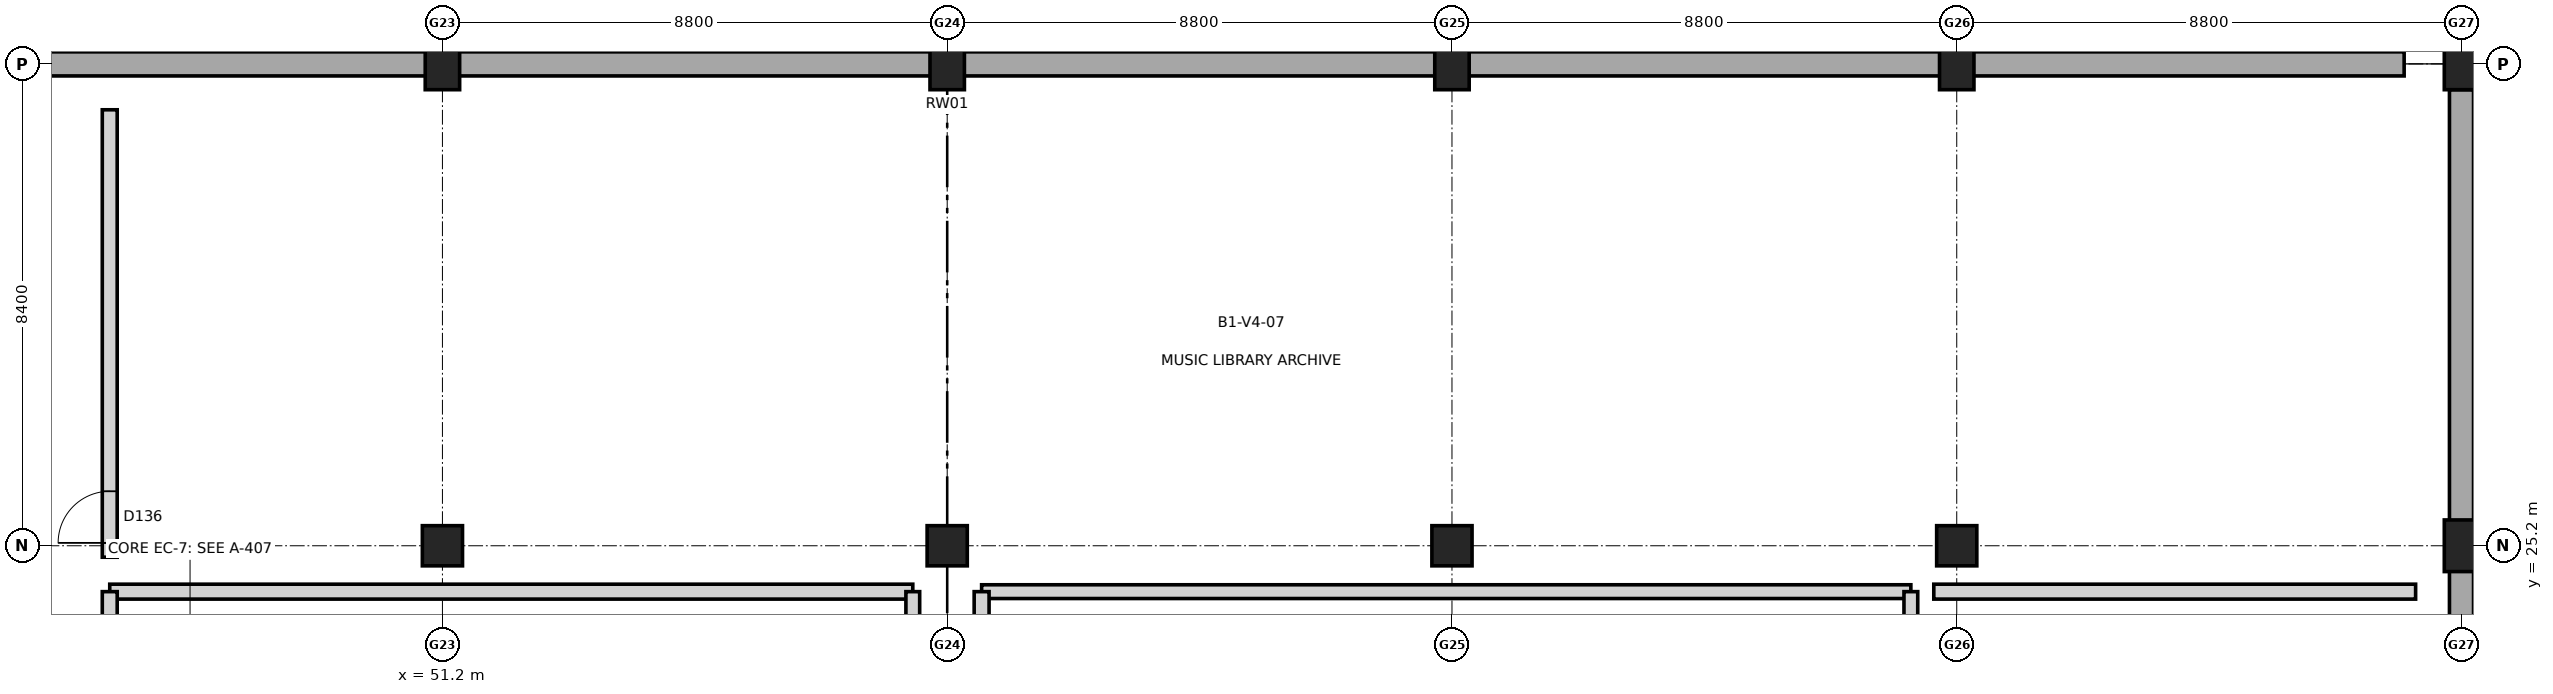
"""IFC4 building model, lengths in metres.
Left out: names, types, materials, properties, quantities, classifications, styles, units other than length and angle.
Written with IfcOpenShell. Run it as: python <this file> out.ifc"""

import sys

from ifc_helpers import new_model, si_unit, direction, frame, frame_2d, origin, origin_2d, place, context, subcontext, project, spatial, rectangle, extrude, element, fill, save


model = new_model("IFC4")
c1 = context("Model", 3, precision=1e-05, world=origin(), true_north=direction((0.0, 1.0)))
c2 = subcontext(c1, "Body", "Model", "MODEL_VIEW")
j1 = project(units=[si_unit("LENGTHUNIT", "METRE"), si_unit("PLANEANGLEUNIT", "RADIAN")], contexts=[c1])
p1 = place(None, origin())
s1 = spatial("IfcSite", under=j1, at=p1, CompositionType="ELEMENT")
p2 = place(p1, origin())
s2 = spatial("IfcBuilding", under=s1, at=p2, CompositionType="ELEMENT")
p3 = place(p2, frame((0.0, 0.0, -5.4)))
s3 = spatial("IfcBuildingStorey", under=s2, at=p3, CompositionType="ELEMENT", Elevation=-5.4)
p4 = place(p3, frame((51.2, 25.2, 0.0), z_axis=(0.0, 0.0, 1.0), x_axis=(1.0, 0.0, 0.0)))
e1 = element("IfcColumn", 1, at=p4, inside=s3, PredefinedType="COLUMN", context=c2, shape_type="SweptSolid", body=[
    extrude(rectangle(XDim=0.7, YDim=0.7, at=origin_2d()), origin(), (0.0, 0.0, 1.0), 5.4),
])
p5 = place(p3, frame((51.2, 33.6, 0.0), z_axis=(0.0, 0.0, 1.0), x_axis=(1.0, 0.0, 0.0)))
e2 = element("IfcColumn", 2, at=p5, inside=s3, PredefinedType="COLUMN", context=c2, shape_type="SweptSolid", body=[
    extrude(rectangle(XDim=0.6, YDim=0.9, at=origin_2d()), origin(), (0.0, 0.0, 1.0), 5.4),
])
p6 = place(p3, frame((60.0, 25.2, 0.0), z_axis=(0.0, 0.0, 1.0), x_axis=(1.0, 0.0, 0.0)))
e3 = element("IfcColumn", 3, at=p6, inside=s3, PredefinedType="COLUMN", context=c2, shape_type="SweptSolid", body=[
    extrude(rectangle(XDim=0.7, YDim=0.7, at=origin_2d()), origin(), (0.0, 0.0, 1.0), 5.4),
])
p7 = place(p3, frame((60.0, 33.6, 0.0), z_axis=(0.0, 0.0, 1.0), x_axis=(1.0, 0.0, 0.0)))
e4 = element("IfcColumn", 4, at=p7, inside=s3, PredefinedType="COLUMN", context=c2, shape_type="SweptSolid", body=[
    extrude(rectangle(XDim=0.6, YDim=0.9, at=origin_2d()), origin(), (0.0, 0.0, 1.0), 5.4),
])
p8 = place(p3, frame((68.8, 25.2, 0.0), z_axis=(0.0, 0.0, 1.0), x_axis=(1.0, 0.0, 0.0)))
e5 = element("IfcColumn", 5, at=p8, inside=s3, PredefinedType="COLUMN", context=c2, shape_type="SweptSolid", body=[
    extrude(rectangle(XDim=0.7, YDim=0.7, at=origin_2d()), origin(), (0.0, 0.0, 1.0), 5.4),
])
p9 = place(p3, frame((68.8, 33.6, 0.0), z_axis=(0.0, 0.0, 1.0), x_axis=(1.0, 0.0, 0.0)))
e6 = element("IfcColumn", 6, at=p9, inside=s3, PredefinedType="COLUMN", context=c2, shape_type="SweptSolid", body=[
    extrude(rectangle(XDim=0.6, YDim=0.9, at=origin_2d()), origin(), (0.0, 0.0, 1.0), 5.4),
])
p10 = place(p3, frame((77.6, 25.2, 0.0), z_axis=(0.0, 0.0, 1.0), x_axis=(1.0, 0.0, 0.0)))
e7 = element("IfcColumn", 7, at=p10, inside=s3, PredefinedType="COLUMN", context=c2, shape_type="SweptSolid", body=[
    extrude(rectangle(XDim=0.7, YDim=0.7, at=origin_2d()), origin(), (0.0, 0.0, 1.0), 5.4),
])
for number, where, z_axis, x_axis in (
    (8, (77.6, 33.6, 0.0), (0.0, 0.0, 1.0), (1.0, 0.0, 0.0)),
    (9, (86.4, 25.2, 0.0), (0.0, 0.0, 1.0), (1.0, 0.0, 0.0)),
    (10, (86.4, 33.6, 0.0), (0.0, 0.0, 1.0), (1.0, 0.0, 0.0)),
):
    element("IfcColumn", number, at=place(p3, frame(where, z_axis=z_axis, x_axis=x_axis)), inside=s3, PredefinedType="COLUMN", context=c2, shape_type="SweptSolid", body=[
        extrude(rectangle(XDim=0.6, YDim=0.9, at=origin_2d()), origin(), (0.0, 0.0, 1.0), 5.4),
    ])
p11 = place(p3, frame((86.4, -37.35, 0.0), z_axis=(0.0, 0.0, 1.0), x_axis=(0.0, 1.0, 0.0)))
e11 = element("IfcWall", 11, at=p11, inside=s3, PredefinedType="USERDEFINED", context=c2, shape_type="SweptSolid", body=[
    extrude(rectangle(XDim=70.5, YDim=0.42, at=frame_2d((35.25, 0.0))), origin(), (0.0, 0.0, 1.0), 5.11),
])
p12 = place(p3, frame((34.6, 33.6, 0.0), z_axis=(0.0, 0.0, 1.0), x_axis=(1.0, 0.0, 0.0)))
e12 = element("IfcWall", 12, at=p12, inside=s3, PredefinedType="USERDEFINED", context=c2, shape_type="SweptSolid", body=[
    extrude(rectangle(XDim=50.8, YDim=0.42, at=frame_2d((25.4, 0.0))), origin(), (0.0, 0.0, 1.0), 5.11),
])
p13 = place(p3, frame((45.4, 24.4, 0.0), z_axis=(0.0, 0.0, 1.0), x_axis=(1.0, 0.0, 0.0)))
e13 = element("IfcWall", 13, at=p13, inside=s3, PredefinedType="PARTITIONING", context=c2, shape_type="SweptSolid", body=[
    extrude(rectangle(XDim=14.0, YDim=0.26, at=frame_2d((7.0, 0.0))), origin(), (0.0, 0.0, 1.0), 5.02),
])
p14 = place(p3, frame((45.4, 22.7, 0.0), z_axis=(0.0, 0.0, 1.0), x_axis=(0.0, 1.0, 0.0)))
e14 = element("IfcWall", 14, at=p14, inside=s3, PredefinedType="PARTITIONING", context=c2, shape_type="SweptSolid", body=[
    extrude(rectangle(XDim=1.7, YDim=0.26, at=frame_2d((0.85, 0.0))), origin(), (0.0, 0.0, 1.0), 5.02),
])
p15 = place(p3, frame((59.4, -1.2, 0.0), z_axis=(0.0, 0.0, 1.0), x_axis=(0.0, 1.0, 0.0)))
e15 = element("IfcWall", 15, at=p15, inside=s3, PredefinedType="PARTITIONING", context=c2, shape_type="SweptSolid", body=[
    extrude(rectangle(XDim=25.6, YDim=0.24, at=frame_2d((12.8, 0.0))), origin(), (0.0, 0.0, 1.0), 5.02),
])
p16 = place(p3, frame((60.6, 24.4, 0.0), z_axis=(0.0, 0.0, 1.0), x_axis=(1.0, 0.0, 0.0)))
e16 = element("IfcWall", 16, at=p16, inside=s3, PredefinedType="PARTITIONING", context=c2, shape_type="SweptSolid", body=[
    extrude(rectangle(XDim=16.2, YDim=0.24, at=frame_2d((8.1, 0.0))), origin(), (0.0, 0.0, 1.0), 5.02),
])
p17 = place(p3, frame((60.6, -1.2, 0.0), z_axis=(0.0, 0.0, 1.0), x_axis=(0.0, 1.0, 0.0)))
e17 = element("IfcWall", 17, at=p17, inside=s3, PredefinedType="PARTITIONING", context=c2, shape_type="SweptSolid", body=[
    extrude(rectangle(XDim=25.6, YDim=0.26, at=frame_2d((12.8, 0.0))), origin(), (0.0, 0.0, 1.0), 5.02),
])
p18 = place(p3, frame((76.8, -1.2, 0.0), z_axis=(0.0, 0.0, 1.0), x_axis=(0.0, 1.0, 0.0)))
e18 = element("IfcWall", 18, at=p18, inside=s3, PredefinedType="PARTITIONING", context=c2, shape_type="SweptSolid", body=[
    extrude(rectangle(XDim=25.6, YDim=0.24, at=frame_2d((12.8, 0.0))), origin(), (0.0, 0.0, 1.0), 5.02),
])
p19 = place(p3, frame((45.4, 25.0, 0.0), z_axis=(0.0, 0.0, 1.0), x_axis=(0.0, 1.0, 0.0)))
e19 = element("IfcWall", 19, at=p19, inside=s3, PredefinedType="PARTITIONING", context=c2, shape_type="SweptSolid", body=[
    extrude(rectangle(XDim=7.8, YDim=0.26, at=frame_2d((3.9, 0.0))), origin(), (0.0, 0.0, 1.0), 5.02),
])
p20 = place(p19, frame((0.25, 0.0, 0.0)))
e20 = element("IfcOpeningElement", 20, at=p20, cuts=e19, PredefinedType="OPENING", context=c2, shape_type="SweptSolid", body=[
    extrude(rectangle(XDim=0.9, YDim=2.1, at=frame_2d((0.45, 1.05))), frame((0.0, 0.14, 0.0), z_axis=(0.0, -1.0, 0.0), x_axis=(1.0, 0.0, 0.0)), (0.0, 0.0, 1.0), 0.28),
])
p21 = place(p3, frame((77.2, 24.4, 0.0), z_axis=(0.0, 0.0, 1.0), x_axis=(1.0, 0.0, 0.0)))
e21 = element("IfcWall", 21, at=p21, inside=s3, PredefinedType="PARTITIONING", context=c2, shape_type="SweptSolid", body=[
    extrude(rectangle(XDim=8.4, YDim=0.26, at=frame_2d((4.2, 0.0))), origin(), (0.0, 0.0, 1.0), 5.02),
])
p22 = place(p20, origin())
e22 = element("IfcDoor", 22, at=p22, inside=s3, OperationType="SINGLE_SWING_LEFT", PredefinedType="DOOR", context=c2, shape_type="SweptSolid", body=[
    extrude(rectangle(XDim=0.9, YDim=2.1, at=frame_2d((0.45, 1.05))), frame((0.0, 0.025, 0.0), z_axis=(0.0, -1.0, 0.0), x_axis=(1.0, 0.0, 0.0)), (0.0, 0.0, 1.0), 0.05),
])
fill(e20, e22)
save(model, sys.argv[1])
